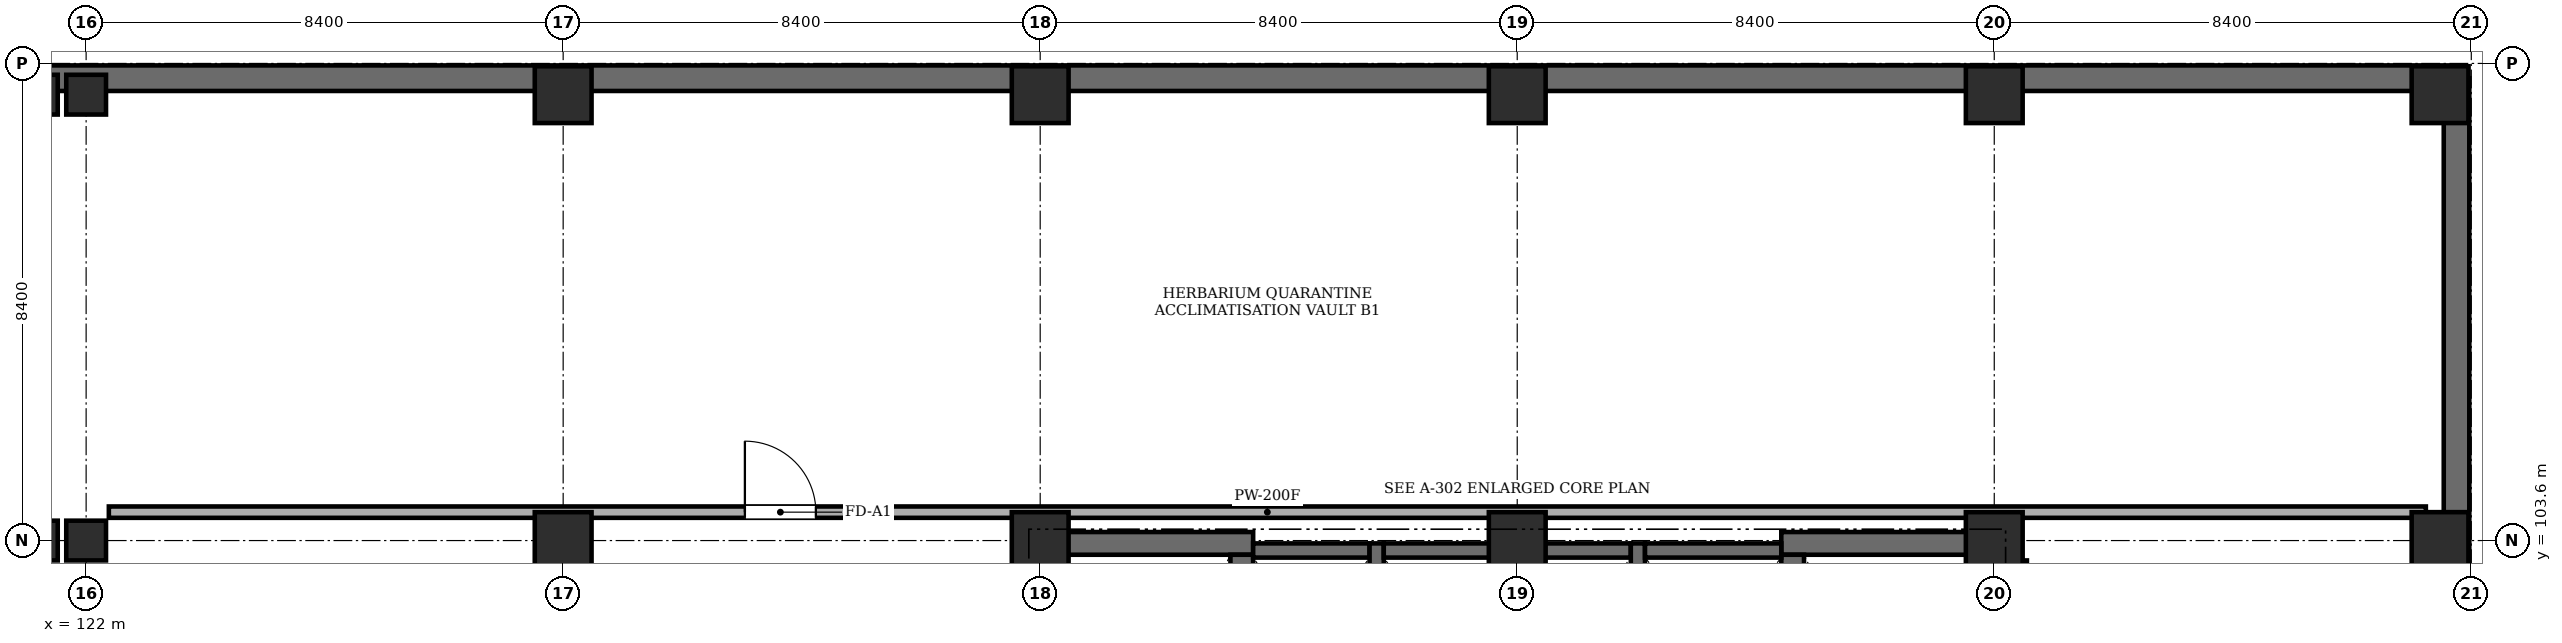
"""IFC4 building model, lengths in metres.
Left out: names, types, materials, properties, quantities, classifications, styles, units other than length and angle.
Written with IfcOpenShell. Run it as: python <this file> out.ifc"""

import sys

from ifc_helpers import new_model, si_unit, direction, frame, frame_2d, origin, origin_2d, place, context, subcontext, project, spatial, rectangle, extrude, element, fill, save


model = new_model("IFC4")
c1 = context("Model", 3, precision=1e-05, world=origin(), true_north=direction((0.0, 1.0)))
c2 = subcontext(c1, "Body", "Model", "MODEL_VIEW")
j1 = project(units=[si_unit("LENGTHUNIT", "METRE"), si_unit("PLANEANGLEUNIT", "RADIAN")], contexts=[c1])
p1 = place(None, origin())
s1 = spatial("IfcSite", under=j1, at=p1, CompositionType="ELEMENT")
p2 = place(p1, origin())
s2 = spatial("IfcBuilding", under=s1, at=p2, CompositionType="ELEMENT")
p3 = place(p2, frame((0.0, 0.0, -4.8)))
s3 = spatial("IfcBuildingStorey", under=s2, at=p3, CompositionType="ELEMENT", Elevation=-4.8)
for number, where, z_axis, x_axis in (
    (1, (121.15, 103.6, 0.0), (0.0, 0.0, 1.0), (1.0, 0.0, 0.0)),
    (2, (121.15, 111.45, 0.0), (0.0, 0.0, 1.0), (1.0, 0.0, 0.0)),
    (3, (122.0, 103.6, 0.0), (0.0, 0.0, 1.0), (1.0, 0.0, 0.0)),
    (4, (122.0, 111.45, 0.0), (0.0, 0.0, 1.0), (1.0, 0.0, 0.0)),
):
    element("IfcColumn", number, at=place(p3, frame(where, z_axis=z_axis, x_axis=x_axis)), inside=s3, PredefinedType="COLUMN", context=c2, shape_type="SweptSolid", body=[
        extrude(rectangle(XDim=0.7, YDim=0.7, at=origin_2d()), origin(), (0.0, 0.0, 1.0), 4.395),
    ])
for number, where, z_axis, x_axis in (
    (5, (130.4, 103.6, 0.0), (0.0, 0.0, 1.0), (1.0, 0.0, 0.0)),
    (6, (130.4, 111.45, 0.0), (0.0, 0.0, 1.0), (1.0, 0.0, 0.0)),
    (7, (138.8, 103.6, 0.0), (0.0, 0.0, 1.0), (1.0, 0.0, 0.0)),
    (8, (138.8, 111.45, 0.0), (0.0, 0.0, 1.0), (1.0, 0.0, 0.0)),
    (9, (147.2, 103.6, 0.0), (0.0, 0.0, 1.0), (1.0, 0.0, 0.0)),
    (10, (147.2, 111.45, 0.0), (0.0, 0.0, 1.0), (1.0, 0.0, 0.0)),
    (11, (155.6, 103.6, 0.0), (0.0, 0.0, 1.0), (1.0, 0.0, 0.0)),
    (12, (155.6, 111.45, 0.0), (0.0, 0.0, 1.0), (1.0, 0.0, 0.0)),
    (13, (163.45, 103.6, 0.0), (0.0, 0.0, 1.0), (1.0, 0.0, 0.0)),
    (14, (163.45, 111.45, 0.0), (0.0, 0.0, 1.0), (1.0, 0.0, 0.0)),
):
    element("IfcColumn", number, at=place(p3, frame(where, z_axis=z_axis, x_axis=x_axis)), inside=s3, PredefinedType="COLUMN", context=c2, shape_type="SweptSolid", body=[
        extrude(rectangle(XDim=1.0, YDim=1.0, at=origin_2d()), origin(), (0.0, 0.0, 1.0), 4.395),
    ])
p4 = place(p3, frame((163.74, 0.26, 0.0), z_axis=(0.0, 0.0, 1.0), x_axis=(0.0, 1.0, 0.0)))
e15 = element("IfcWall", 15, at=p4, inside=s3, PredefinedType="SHEAR", context=c2, shape_type="SweptSolid", body=[
    extrude(rectangle(XDim=111.48, YDim=0.45, at=frame_2d((55.74, 0.0))), origin(), (0.0, 0.0, 1.0), 3.75),
])
p5 = place(p3, frame((163.74, 111.74, 0.0), z_axis=(0.0, 0.0, 1.0), x_axis=(-1.0, 0.0, 0.0)))
e16 = element("IfcWall", 16, at=p5, inside=s3, PredefinedType="SHEAR", context=c2, shape_type="SweptSolid", body=[
    extrude(rectangle(XDim=163.48, YDim=0.45, at=frame_2d((81.74, 0.0))), origin(), (0.0, 0.0, 1.0), 3.75),
])
p6 = place(p3, frame((138.65, 103.55, 0.0), z_axis=(0.0, 0.0, 1.0), x_axis=(1.0, 0.0, 0.0)))
e17 = element("IfcWall", 17, at=p6, inside=s3, PredefinedType="SHEAR", context=c2, shape_type="SweptSolid", body=[
    extrude(rectangle(XDim=3.9, YDim=0.4, at=frame_2d((1.95, 0.0))), origin(), (0.0, 0.0, 1.0), 4.395),
])
p7 = place(p3, frame((138.85, 95.45, 0.0), z_axis=(0.0, 0.0, 1.0), x_axis=(0.0, 1.0, 0.0)))
e18 = element("IfcWall", 18, at=p7, inside=s3, PredefinedType="SHEAR", context=c2, shape_type="SweptSolid", body=[
    extrude(rectangle(XDim=7.9, YDim=0.4, at=frame_2d((3.95, 0.0))), origin(), (0.0, 0.0, 1.0), 4.395),
])
p8 = place(p3, frame((142.35, 95.45, 0.0), z_axis=(0.0, 0.0, 1.0), x_axis=(0.0, 1.0, 0.0)))
e19 = element("IfcWall", 19, at=p8, inside=s3, PredefinedType="SHEAR", context=c2, shape_type="SweptSolid", body=[
    extrude(rectangle(XDim=7.9, YDim=0.4, at=frame_2d((3.95, 0.0))), origin(), (0.0, 0.0, 1.0), 4.395),
])
p9 = place(p8, frame((0.22, 0.0, 0.0)))
e20 = element("IfcOpeningElement", 20, at=p9, cuts=e19, PredefinedType="OPENING", context=c2, shape_type="SweptSolid", body=[
    extrude(rectangle(XDim=1.15, YDim=2.15, at=frame_2d((0.575, 1.075))), frame((0.0, 0.21, 0.0), z_axis=(0.0, -1.0, 0.0), x_axis=(1.0, 0.0, 0.0)), (0.0, 0.0, 1.0), 0.42),
])
p10 = place(p3, frame((151.85, 103.55, 0.0), z_axis=(0.0, 0.0, 1.0), x_axis=(1.0, 0.0, 0.0)))
e21 = element("IfcWall", 21, at=p10, inside=s3, PredefinedType="SHEAR", context=c2, shape_type="SweptSolid", body=[
    extrude(rectangle(XDim=3.9, YDim=0.4, at=frame_2d((1.95, 0.0))), origin(), (0.0, 0.0, 1.0), 4.395),
])
p11 = place(p3, frame((152.05, 95.45, 0.0), z_axis=(0.0, 0.0, 1.0), x_axis=(0.0, 1.0, 0.0)))
e22 = element("IfcWall", 22, at=p11, inside=s3, PredefinedType="SHEAR", context=c2, shape_type="SweptSolid", body=[
    extrude(rectangle(XDim=7.9, YDim=0.4, at=frame_2d((3.95, 0.0))), origin(), (0.0, 0.0, 1.0), 4.395),
])
p12 = place(p11, frame((0.35, 0.0, 0.0)))
e23 = element("IfcOpeningElement", 23, at=p12, cuts=e22, PredefinedType="OPENING", context=c2, shape_type="SweptSolid", body=[
    extrude(rectangle(XDim=1.15, YDim=2.15, at=frame_2d((0.575, 1.075))), frame((0.0, 0.21, 0.0), z_axis=(0.0, -1.0, 0.0), x_axis=(1.0, 0.0, 0.0)), (0.0, 0.0, 1.0), 0.42),
])
p13 = place(p3, frame((155.55, 95.45, 0.0), z_axis=(0.0, 0.0, 1.0), x_axis=(0.0, 1.0, 0.0)))
e24 = element("IfcWall", 24, at=p13, inside=s3, PredefinedType="SHEAR", context=c2, shape_type="SweptSolid", body=[
    extrude(rectangle(XDim=7.9, YDim=0.4, at=frame_2d((3.95, 0.0))), origin(), (0.0, 0.0, 1.0), 4.395),
])
p14 = place(p3, frame((142.55, 103.425, 0.0), z_axis=(0.0, 0.0, 1.0), x_axis=(1.0, 0.0, 0.0)))
e25 = element("IfcWall", 25, at=p14, inside=s3, PredefinedType="SHEAR", context=c2, shape_type="SweptSolid", body=[
    extrude(rectangle(XDim=2.05, YDim=0.25, at=frame_2d((1.025, 0.0))), origin(), (0.0, 0.0, 1.0), 4.395),
])
p15 = place(p3, frame((144.725, 100.15, 0.0), z_axis=(0.0, 0.0, 1.0), x_axis=(0.0, 1.0, 0.0)))
e26 = element("IfcWall", 26, at=p15, inside=s3, PredefinedType="SHEAR", context=c2, shape_type="SweptSolid", body=[
    extrude(rectangle(XDim=3.4, YDim=0.25, at=frame_2d((1.7, 0.0))), origin(), (0.0, 0.0, 1.0), 4.395),
])
p16 = place(p3, frame((144.85, 103.425, 0.0), z_axis=(0.0, 0.0, 1.0), x_axis=(1.0, 0.0, 0.0)))
e27 = element("IfcWall", 27, at=p16, inside=s3, PredefinedType="SHEAR", context=c2, shape_type="SweptSolid", body=[
    extrude(rectangle(XDim=2.05, YDim=0.25, at=frame_2d((1.025, 0.0))), origin(), (0.0, 0.0, 1.0), 4.395),
])
p17 = place(p3, frame((147.025, 100.15, 0.0), z_axis=(0.0, 0.0, 1.0), x_axis=(0.0, 1.0, 0.0)))
e28 = element("IfcWall", 28, at=p17, inside=s3, PredefinedType="SHEAR", context=c2, shape_type="SweptSolid", body=[
    extrude(rectangle(XDim=3.4, YDim=0.25, at=frame_2d((1.7, 0.0))), origin(), (0.0, 0.0, 1.0), 4.395),
])
p18 = place(p3, frame((147.15, 103.425, 0.0), z_axis=(0.0, 0.0, 1.0), x_axis=(1.0, 0.0, 0.0)))
e29 = element("IfcWall", 29, at=p18, inside=s3, PredefinedType="SHEAR", context=c2, shape_type="SweptSolid", body=[
    extrude(rectangle(XDim=2.05, YDim=0.25, at=frame_2d((1.025, 0.0))), origin(), (0.0, 0.0, 1.0), 4.395),
])
p19 = place(p3, frame((149.325, 100.35, 0.0), z_axis=(0.0, 0.0, 1.0), x_axis=(0.0, 1.0, 0.0)))
e30 = element("IfcWall", 30, at=p19, inside=s3, PredefinedType="SHEAR", context=c2, shape_type="SweptSolid", body=[
    extrude(rectangle(XDim=3.2, YDim=0.25, at=frame_2d((1.6, 0.0))), origin(), (0.0, 0.0, 1.0), 4.395),
])
p20 = place(p3, frame((149.45, 103.425, 0.0), z_axis=(0.0, 0.0, 1.0), x_axis=(1.0, 0.0, 0.0)))
e31 = element("IfcWall", 31, at=p20, inside=s3, PredefinedType="SHEAR", context=c2, shape_type="SweptSolid", body=[
    extrude(rectangle(XDim=2.4, YDim=0.25, at=frame_2d((1.2, 0.0))), origin(), (0.0, 0.0, 1.0), 4.395),
])
p21 = place(p3, frame((156.1, 94.68, 0.0), z_axis=(0.0, 0.0, 1.0), x_axis=(0.0, 1.0, 0.0)))
e32 = element("IfcWall", 32, at=p21, inside=s3, PredefinedType="PARTITIONING", context=c2, shape_type="SweptSolid", body=[
    extrude(rectangle(XDim=8.57, YDim=0.15, at=frame_2d((4.285, 0.0))), origin(), (0.0, 0.0, 1.0), 4.395),
])
p22 = place(p3, frame((122.4, 104.1, 0.0), z_axis=(0.0, 0.0, 1.0), x_axis=(1.0, 0.0, 0.0)))
e33 = element("IfcWall", 33, at=p22, inside=s3, PredefinedType="SOLIDWALL", context=c2, shape_type="SweptSolid", body=[
    extrude(rectangle(XDim=40.8, YDim=0.2, at=frame_2d((20.4, 0.0))), origin(), (0.0, 0.0, 1.0), 4.395),
])
p23 = place(p22, frame((11.2, 0.0, 0.0)))
e34 = element("IfcOpeningElement", 34, at=p23, cuts=e33, PredefinedType="OPENING", context=c2, shape_type="SweptSolid", body=[
    extrude(rectangle(XDim=1.25, YDim=2.2, at=frame_2d((0.625, 1.1))), frame((0.0, 0.11, 0.0), z_axis=(0.0, -1.0, 0.0), x_axis=(1.0, 0.0, 0.0)), (0.0, 0.0, 1.0), 0.22),
])
p24 = place(p23, origin())
e35 = element("IfcDoor", 35, at=p24, inside=s3, OperationType="SINGLE_SWING_LEFT", PredefinedType="DOOR", context=c2, shape_type="SweptSolid", body=[
    extrude(rectangle(XDim=1.25, YDim=2.2, at=frame_2d((0.625, 1.1))), frame((0.0, 0.025, 0.0), z_axis=(0.0, -1.0, 0.0), x_axis=(1.0, 0.0, 0.0)), (0.0, 0.0, 1.0), 0.05),
])
fill(e34, e35)
save(model, sys.argv[1])
